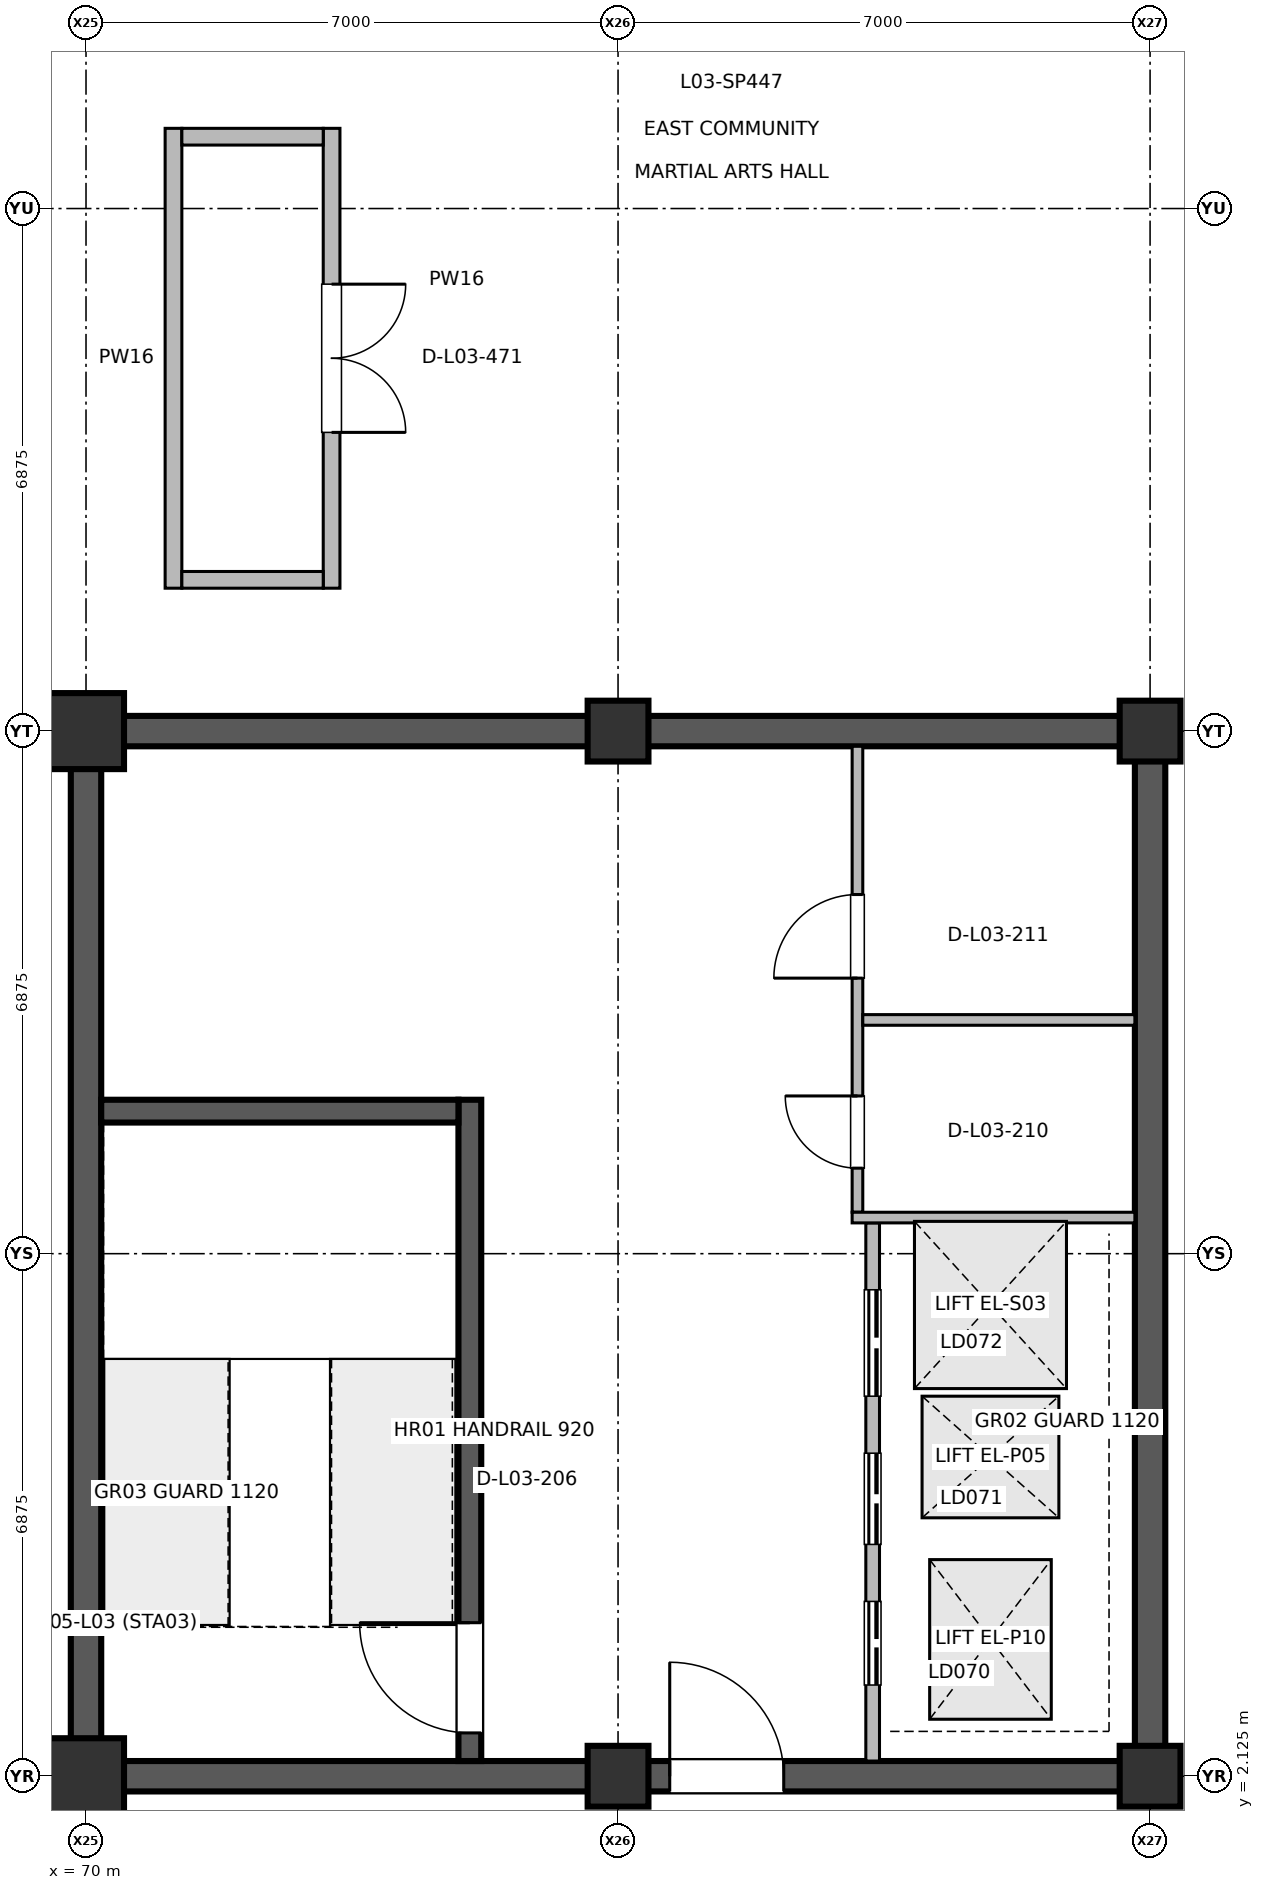
"""IFC4 building model, lengths in metres.
Left out: names, types, materials, properties, quantities, classifications, styles, units other than length and angle.
Written with IfcOpenShell. Run it as: python <this file> out.ifc"""

import sys

from ifc_helpers import new_model, si_unit, direction, frame, frame_2d, origin, origin_2d, place, context, subcontext, project, spatial, rectangle, extrude, element, fill, save


model = new_model("IFC4")
c1 = context("Model", 3, precision=1e-05, world=origin(), true_north=direction((0.0, 1.0)))
c2 = subcontext(c1, "Body", "Model", "MODEL_VIEW")
j1 = project(units=[si_unit("LENGTHUNIT", "METRE"), si_unit("PLANEANGLEUNIT", "RADIAN")], contexts=[c1])
p1 = place(None, origin())
s1 = spatial("IfcSite", under=j1, at=p1, CompositionType="ELEMENT")
p2 = place(p1, origin())
s2 = spatial("IfcBuilding", under=s1, at=p2, CompositionType="ELEMENT")
p3 = place(p2, frame((0.0, 0.0, 11.4)))
s3 = spatial("IfcBuildingStorey", under=s2, at=p3, CompositionType="ELEMENT", Elevation=11.4)
for number, where, z_axis, x_axis in (
    (1, (70.0, 2.125, 0.0), (0.0, 0.0, 1.0), (1.0, 0.0, 0.0)),
    (2, (70.0, 15.875, 0.0), (0.0, 0.0, 1.0), (1.0, 0.0, 0.0)),
):
    element("IfcColumn", number, at=place(p3, frame(where, z_axis=z_axis, x_axis=x_axis)), inside=s3, PredefinedType="COLUMN", context=c2, shape_type="SweptSolid", body=[
        extrude(rectangle(XDim=1.0, YDim=1.0, at=origin_2d()), origin(), (0.0, 0.0, 1.0), 4.798),
    ])
for number, where, z_axis, x_axis in (
    (3, (77.0, 2.125, 0.0), (0.0, 0.0, 1.0), (1.0, 0.0, 0.0)),
    (4, (77.0, 15.875, 0.0), (0.0, 0.0, 1.0), (1.0, 0.0, 0.0)),
    (5, (84.0, 2.125, 0.0), (0.0, 0.0, 1.0), (1.0, 0.0, 0.0)),
    (6, (84.0, 15.875, 0.0), (0.0, 0.0, 1.0), (1.0, 0.0, 0.0)),
):
    element("IfcColumn", number, at=place(p3, frame(where, z_axis=z_axis, x_axis=x_axis)), inside=s3, PredefinedType="COLUMN", context=c2, shape_type="SweptSolid", body=[
        extrude(rectangle(XDim=0.8, YDim=0.8, at=origin_2d()), origin(), (0.0, 0.0, 1.0), 4.798),
    ])
for number, where, z_axis, x_axis in (
    (7, (70.0, 2.325, 0.0), (0.0, 0.0, 1.0), (0.0, 1.0, 0.0)),
    (8, (84.0, 2.325, 0.0), (0.0, 0.0, 1.0), (0.0, 1.0, 0.0)),
):
    element("IfcWall", number, at=place(p3, frame(where, z_axis=z_axis, x_axis=x_axis)), inside=s3, PredefinedType="SHEAR", context=c2, shape_type="SweptSolid", body=[
        extrude(rectangle(XDim=13.35, YDim=0.4, at=frame_2d((6.675, 0.0))), origin(), (0.0, 0.0, 1.0), 4.58),
    ])
p4 = place(p3, frame((70.2, 2.125, 0.0), z_axis=(0.0, 0.0, 1.0), x_axis=(1.0, 0.0, 0.0)))
e9 = element("IfcWall", 9, at=p4, inside=s3, PredefinedType="SHEAR", context=c2, shape_type="SweptSolid", body=[
    extrude(rectangle(XDim=13.6, YDim=0.4, at=frame_2d((6.8, 0.0))), origin(), (0.0, 0.0, 1.0), 4.58),
])
p5 = place(p4, frame((7.48, 0.0, 0.0)))
e10 = element("IfcOpeningElement", 10, at=p5, cuts=e9, PredefinedType="OPENING", context=c2, shape_type="SweptSolid", body=[
    extrude(rectangle(XDim=1.5, YDim=2.2, at=frame_2d((0.75, 1.1))), frame((0.0, 0.21, 0.0), z_axis=(0.0, -1.0, 0.0), x_axis=(1.0, 0.0, 0.0)), (0.0, 0.0, 1.0), 0.42),
])
p6 = place(p3, frame((70.2, 15.875, 0.0), z_axis=(0.0, 0.0, 1.0), x_axis=(1.0, 0.0, 0.0)))
e11 = element("IfcWall", 11, at=p6, inside=s3, PredefinedType="SHEAR", context=c2, shape_type="SweptSolid", body=[
    extrude(rectangle(XDim=13.6, YDim=0.4, at=frame_2d((6.8, 0.0))), origin(), (0.0, 0.0, 1.0), 4.58),
])
p7 = place(p3, frame((75.05, 2.325, 0.0), z_axis=(0.0, 0.0, 1.0), x_axis=(0.0, 1.0, 0.0)))
e12 = element("IfcWall", 12, at=p7, inside=s3, PredefinedType="SHEAR", context=c2, shape_type="SweptSolid", body=[
    extrude(rectangle(XDim=8.7, YDim=0.3, at=frame_2d((4.35, 0.0))), origin(), (0.0, 0.0, 1.0), 4.58),
])
p8 = place(p7, frame((0.37, 0.0, 0.0)))
e13 = element("IfcOpeningElement", 13, at=p8, cuts=e12, PredefinedType="OPENING", context=c2, shape_type="SweptSolid", body=[
    extrude(rectangle(XDim=1.45, YDim=2.2, at=frame_2d((0.725, 1.1))), frame((0.0, 0.16, 0.0), z_axis=(0.0, -1.0, 0.0), x_axis=(1.0, 0.0, 0.0)), (0.0, 0.0, 1.0), 0.32),
])
p9 = place(p3, frame((80.35, 2.325, 0.0), z_axis=(0.0, 0.0, 1.0), x_axis=(0.0, 1.0, 0.0)))
e14 = element("IfcWall", 14, at=p9, inside=s3, PredefinedType="PARTITIONING", context=c2, shape_type="SweptSolid", body=[
    extrude(rectangle(XDim=7.08, YDim=0.18, at=frame_2d((3.54, 0.0))), origin(), (0.0, 0.0, 1.0), 3.82),
])
p10 = place(p9, frame((1.0, 0.0, 0.0)))
e15 = element("IfcOpeningElement", 15, at=p10, cuts=e14, PredefinedType="OPENING", context=c2, shape_type="SweptSolid", body=[
    extrude(rectangle(XDim=1.1, YDim=2.2, at=frame_2d((0.55, 1.1))), frame((0.0, 0.1, 0.0), z_axis=(0.0, -1.0, 0.0), x_axis=(1.0, 0.0, 0.0)), (0.0, 0.0, 1.0), 0.2),
])
p11 = place(p9, frame((2.85, 0.0, 0.0)))
e16 = element("IfcOpeningElement", 16, at=p11, cuts=e14, PredefinedType="OPENING", context=c2, shape_type="SweptSolid", body=[
    extrude(rectangle(XDim=1.2, YDim=2.25, at=frame_2d((0.6, 1.125))), frame((0.0, 0.1, 0.0), z_axis=(0.0, -1.0, 0.0), x_axis=(1.0, 0.0, 0.0)), (0.0, 0.0, 1.0), 0.2),
])
p12 = place(p9, frame((4.8, 0.0, 0.0)))
e17 = element("IfcOpeningElement", 17, at=p12, cuts=e14, PredefinedType="OPENING", context=c2, shape_type="SweptSolid", body=[
    extrude(rectangle(XDim=1.4, YDim=2.3, at=frame_2d((0.7, 1.15))), frame((0.0, 0.1, 0.0), z_axis=(0.0, -1.0, 0.0), x_axis=(1.0, 0.0, 0.0)), (0.0, 0.0, 1.0), 0.2),
])
p13 = place(p3, frame((80.15, 9.545, 0.0), z_axis=(0.0, 0.0, 1.0), x_axis=(0.0, 1.0, 0.0)))
e18 = element("IfcWall", 18, at=p13, inside=s3, PredefinedType="PARTITIONING", context=c2, shape_type="SweptSolid", body=[
    extrude(rectangle(XDim=6.13, YDim=0.14, at=frame_2d((3.065, 0.0))), origin(), (0.0, 0.0, 1.0), 3.82),
])
p14 = place(p13, frame((0.58, 0.0, 0.0)))
e19 = element("IfcOpeningElement", 19, at=p14, cuts=e18, PredefinedType="OPENING", context=c2, shape_type="SweptSolid", body=[
    extrude(rectangle(XDim=0.95, YDim=2.15, at=frame_2d((0.475, 1.075))), frame((0.0, 0.08, 0.0), z_axis=(0.0, -1.0, 0.0), x_axis=(1.0, 0.0, 0.0)), (0.0, 0.0, 1.0), 0.16),
])
p15 = place(p13, frame((3.08, 0.0, 0.0)))
e20 = element("IfcOpeningElement", 20, at=p15, cuts=e18, PredefinedType="OPENING", context=c2, shape_type="SweptSolid", body=[
    extrude(rectangle(XDim=1.1, YDim=2.15, at=frame_2d((0.55, 1.075))), frame((0.0, 0.08, 0.0), z_axis=(0.0, -1.0, 0.0), x_axis=(1.0, 0.0, 0.0)), (0.0, 0.0, 1.0), 0.16),
])
p16 = place(p3, frame((73.231, 23.805, 0.0), z_axis=(0.0, 0.0, 1.0), x_axis=(0.0, -1.0, 0.0)))
e21 = element("IfcWall", 21, at=p16, inside=s3, PredefinedType="PARTITIONING", context=c2, shape_type="SweptSolid", body=[
    extrude(rectangle(XDim=6.05, YDim=0.22, at=frame_2d((3.025, 0.0))), origin(), (0.0, 0.0, 1.0), 3.82),
])
p17 = place(p16, frame((2.05, 0.0, 0.0)))
e22 = element("IfcOpeningElement", 22, at=p17, cuts=e21, PredefinedType="OPENING", context=c2, shape_type="SweptSolid", body=[
    extrude(rectangle(XDim=1.95, YDim=2.35, at=frame_2d((0.975, 1.175))), frame((0.0, 0.12, 0.0), z_axis=(0.0, -1.0, 0.0), x_axis=(1.0, 0.0, 0.0)), (0.0, 0.0, 1.0), 0.24),
])
p18 = place(p3, frame((80.08, 9.475, 0.0), z_axis=(0.0, 0.0, 1.0), x_axis=(1.0, 0.0, 0.0)))
e23 = element("IfcWall", 23, at=p18, inside=s3, PredefinedType="PARTITIONING", context=c2, shape_type="SweptSolid", body=[
    extrude(rectangle(XDim=3.72, YDim=0.14, at=frame_2d((1.86, 0.0))), origin(), (0.0, 0.0, 1.0), 3.82),
])
p19 = place(p3, frame((80.22, 12.075, 0.0), z_axis=(0.0, 0.0, 1.0), x_axis=(1.0, 0.0, 0.0)))
e24 = element("IfcWall", 24, at=p19, inside=s3, PredefinedType="PARTITIONING", context=c2, shape_type="SweptSolid", body=[
    extrude(rectangle(XDim=3.58, YDim=0.14, at=frame_2d((1.79, 0.0))), origin(), (0.0, 0.0, 1.0), 3.82),
])
p20 = place(p3, frame((71.151, 17.755, 0.0), z_axis=(0.0, 0.0, 1.0), x_axis=(0.0, 1.0, 0.0)))
e25 = element("IfcWall", 25, at=p20, inside=s3, PredefinedType="PARTITIONING", context=c2, shape_type="SweptSolid", body=[
    extrude(rectangle(XDim=6.05, YDim=0.22, at=frame_2d((3.025, 0.0))), origin(), (0.0, 0.0, 1.0), 3.82),
])
for number, where, z_axis, x_axis in (
    (26, (71.261, 17.865, 0.0), (0.0, 0.0, 1.0), (1.0, 0.0, 0.0)),
    (27, (71.261, 23.695, 0.0), (0.0, 0.0, 1.0), (1.0, 0.0, 0.0)),
):
    element("IfcWall", number, at=place(p3, frame(where, z_axis=z_axis, x_axis=x_axis)), inside=s3, PredefinedType="PARTITIONING", context=c2, shape_type="SweptSolid", body=[
        extrude(rectangle(XDim=1.86, YDim=0.22, at=frame_2d((0.93, 0.0))), origin(), (0.0, 0.0, 1.0), 3.82),
    ])
p21 = place(p3, frame((70.2, 10.875, 0.0), z_axis=(0.0, 0.0, 1.0), x_axis=(1.0, 0.0, 0.0)))
e28 = element("IfcWall", 28, at=p21, inside=s3, PredefinedType="SHEAR", context=c2, shape_type="SweptSolid", body=[
    extrude(rectangle(XDim=4.7, YDim=0.3, at=frame_2d((2.35, 0.0))), origin(), (0.0, 0.0, 1.0), 4.58),
])
p22 = place(p5, origin())
e29 = element("IfcDoor", 29, at=p22, inside=s3, OperationType="SINGLE_SWING_LEFT", PredefinedType="DOOR", context=c2, shape_type="SweptSolid", body=[
    extrude(rectangle(XDim=1.5, YDim=2.2, at=frame_2d((0.75, 1.1))), frame((0.0, 0.025, 0.0), z_axis=(0.0, -1.0, 0.0), x_axis=(1.0, 0.0, 0.0)), (0.0, 0.0, 1.0), 0.05),
])
fill(e10, e29)
p23 = place(p8, origin())
e30 = element("IfcDoor", 30, at=p23, inside=s3, OperationType="SINGLE_SWING_RIGHT", PredefinedType="DOOR", context=c2, shape_type="SweptSolid", body=[
    extrude(rectangle(XDim=1.45, YDim=2.2, at=frame_2d((0.725, 1.1))), frame((0.0, 0.025, 0.0), z_axis=(0.0, -1.0, 0.0), x_axis=(1.0, 0.0, 0.0)), (0.0, 0.0, 1.0), 0.05),
])
fill(e13, e30)
p24 = place(p10, origin())
e31 = element("IfcDoor", 31, at=p24, inside=s3, OperationType="DOUBLE_DOOR_SLIDING", PredefinedType="DOOR", context=c2, shape_type="SweptSolid", body=[
    extrude(rectangle(XDim=1.1, YDim=2.2, at=frame_2d((0.55, 1.1))), frame((0.0, 0.025, 0.0), z_axis=(0.0, -1.0, 0.0), x_axis=(1.0, 0.0, 0.0)), (0.0, 0.0, 1.0), 0.05),
])
fill(e15, e31)
p25 = place(p11, origin())
e32 = element("IfcDoor", 32, at=p25, inside=s3, OperationType="DOUBLE_DOOR_SLIDING", PredefinedType="DOOR", context=c2, shape_type="SweptSolid", body=[
    extrude(rectangle(XDim=1.2, YDim=2.25, at=frame_2d((0.6, 1.125))), frame((0.0, 0.025, 0.0), z_axis=(0.0, -1.0, 0.0), x_axis=(1.0, 0.0, 0.0)), (0.0, 0.0, 1.0), 0.05),
])
fill(e16, e32)
p26 = place(p12, origin())
e33 = element("IfcDoor", 33, at=p26, inside=s3, OperationType="DOUBLE_DOOR_SLIDING", PredefinedType="DOOR", context=c2, shape_type="SweptSolid", body=[
    extrude(rectangle(XDim=1.4, YDim=2.3, at=frame_2d((0.7, 1.15))), frame((0.0, 0.025, 0.0), z_axis=(0.0, -1.0, 0.0), x_axis=(1.0, 0.0, 0.0)), (0.0, 0.0, 1.0), 0.05),
])
fill(e17, e33)
p27 = place(p14, origin())
e34 = element("IfcDoor", 34, at=p27, inside=s3, OperationType="SINGLE_SWING_RIGHT", PredefinedType="DOOR", context=c2, shape_type="SweptSolid", body=[
    extrude(rectangle(XDim=0.95, YDim=2.15, at=frame_2d((0.475, 1.075))), frame((0.0, 0.025, 0.0), z_axis=(0.0, -1.0, 0.0), x_axis=(1.0, 0.0, 0.0)), (0.0, 0.0, 1.0), 0.05),
])
fill(e19, e34)
p28 = place(p15, origin())
e35 = element("IfcDoor", 35, at=p28, inside=s3, OperationType="SINGLE_SWING_LEFT", PredefinedType="DOOR", context=c2, shape_type="SweptSolid", body=[
    extrude(rectangle(XDim=1.1, YDim=2.15, at=frame_2d((0.55, 1.075))), frame((0.0, 0.025, 0.0), z_axis=(0.0, -1.0, 0.0), x_axis=(1.0, 0.0, 0.0)), (0.0, 0.0, 1.0), 0.05),
])
fill(e20, e35)
p29 = place(p17, origin())
e36 = element("IfcDoor", 36, at=p29, inside=s3, OperationType="DOUBLE_DOOR_SINGLE_SWING", PredefinedType="DOOR", context=c2, shape_type="SweptSolid", body=[
    extrude(rectangle(XDim=1.95, YDim=2.35, at=frame_2d((0.975, 1.175))), frame((0.0, 0.025, 0.0), z_axis=(0.0, -1.0, 0.0), x_axis=(1.0, 0.0, 0.0)), (0.0, 0.0, 1.0), 0.05),
])
fill(e22, e36)
save(model, sys.argv[1])
